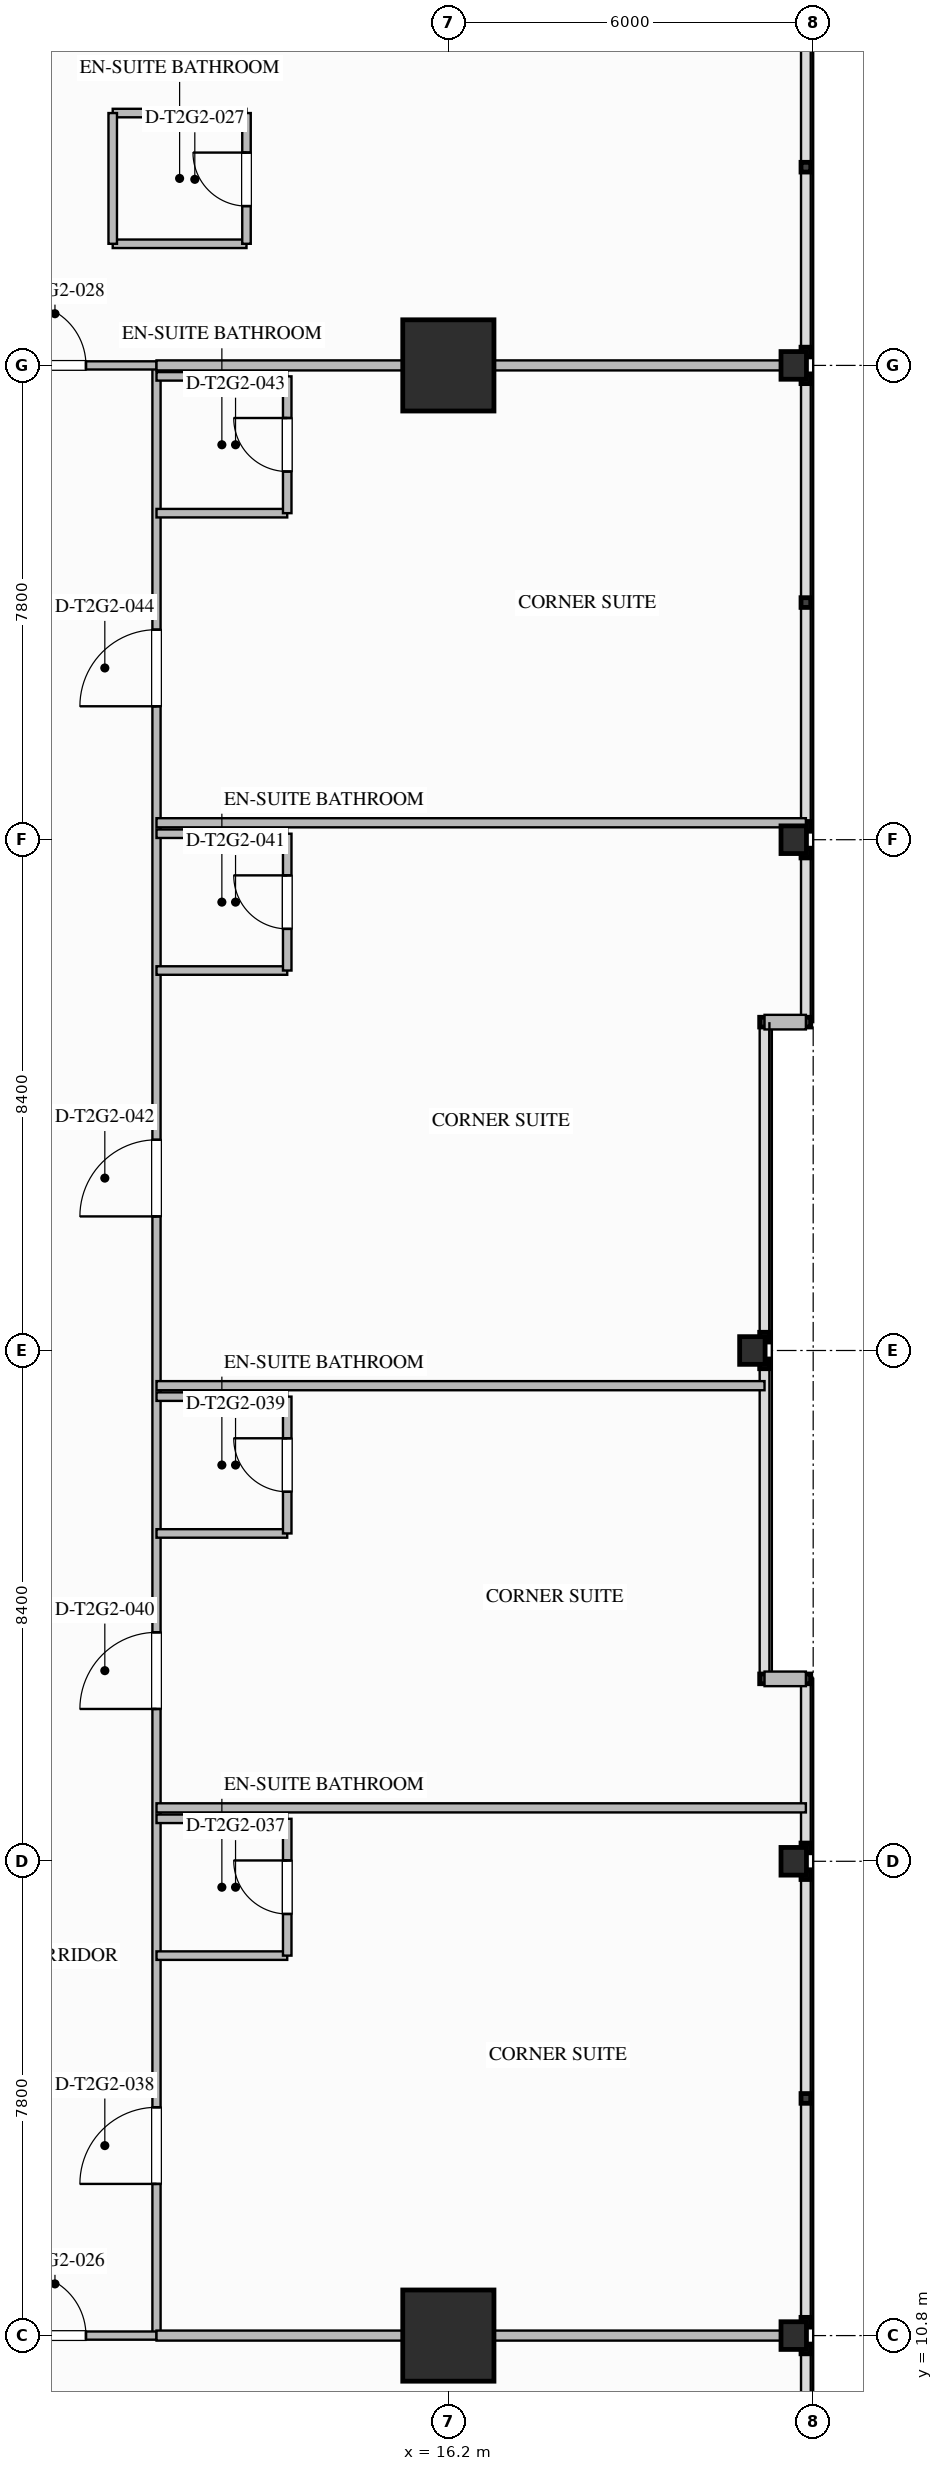
"""IFC4 building model, lengths in metres.
Left out: names, types, materials, properties, quantities, classifications, styles, units other than length and angle.
Written with IfcOpenShell. Run it as: python <this file> out.ifc"""

import sys

from ifc_helpers import new_model, si_unit, direction, frame, frame_2d, origin, origin_2d, place, context, subcontext, project, spatial, rectangle, i_section, extrude, element, fill, save


model = new_model("IFC4")
c1 = context("Model", 3, precision=1e-05, world=origin(), true_north=direction((0.0, 1.0)))
c2 = subcontext(c1, "Body", "Model", "MODEL_VIEW")
j1 = project(units=[si_unit("LENGTHUNIT", "METRE"), si_unit("PLANEANGLEUNIT", "RADIAN")], contexts=[c1])
p1 = place(None, origin())
s1 = spatial("IfcSite", under=j1, at=p1, CompositionType="ELEMENT")
p2 = place(p1, origin())
s2 = spatial("IfcBuilding", under=s1, at=p2, CompositionType="ELEMENT")
p3 = place(p2, frame((0.0, 0.0, 102.3)))
s3 = spatial("IfcBuildingStorey", under=s2, at=p3, CompositionType="ELEMENT", Elevation=102.3)
for number, where, z_axis, x_axis in (
    (1, (16.2, 10.8, 0.0), (0.0, 0.0, 1.0), (1.0, 0.0, 0.0)),
    (2, (16.2, 43.2, 0.0), (0.0, 0.0, 1.0), (1.0, 0.0, 0.0)),
):
    element("IfcColumn", number, at=place(p3, frame(where, z_axis=z_axis, x_axis=x_axis)), inside=s3, PredefinedType="COLUMN", context=c2, shape_type="SweptSolid", body=[
        extrude(rectangle(XDim=1.5, YDim=1.5, at=origin_2d()), origin(), (0.0, 0.0, 1.0), 3.5),
    ])
for number, where, z_axis, x_axis in (
    (3, (21.88, 10.8, 0.0), (0.0, 0.0, 1.0), (1.0, 0.0, 0.0)),
    (4, (21.88, 18.6, 0.0), (0.0, 0.0, 1.0), (1.0, 0.0, 0.0)),
    (5, (21.2, 27.0, 0.0), (0.0, 0.0, 1.0), (1.0, 0.0, 0.0)),
    (6, (21.88, 35.4, 0.0), (0.0, 0.0, 1.0), (1.0, 0.0, 0.0)),
    (7, (21.88, 43.2, 0.0), (0.0, 0.0, 1.0), (1.0, 0.0, 0.0)),
):
    element("IfcColumn", number, at=place(p3, frame(where, z_axis=z_axis, x_axis=x_axis)), inside=s3, PredefinedType="COLUMN", context=c2, shape_type="SweptSolid", body=[
        extrude(i_section(OverallWidth=0.418, OverallDepth=0.455, WebThickness=0.042, FlangeThickness=0.068, FilletRadius=0.03, at=origin_2d()), origin(), (0.0, 0.0, 1.0), 3.497),
    ])
for number, where, z_axis, x_axis in (
    (8, (22.08, 32.4, 0.0), (0.0, 0.0, 1.0), (-1.0, 0.0, 0.0)),
    (9, (21.4, 21.6, 0.0), (0.0, 0.0, 1.0), (1.0, 0.0, 0.0)),
):
    element("IfcWall", number, at=place(p3, frame(where, z_axis=z_axis, x_axis=x_axis)), inside=s3, PredefinedType="STANDARD", context=c2, shape_type="SweptSolid", body=[
        extrude(rectangle(XDim=0.68, YDim=0.24, at=frame_2d((0.34, 0.0))), origin(), (0.0, 0.0, 1.0), 3.24),
    ])
p4 = place(p3, frame((11.4, 10.8, 0.0), z_axis=(0.0, 0.0, 1.0), x_axis=(0.0, 1.0, 0.0)))
e10 = element("IfcWall", 10, at=p4, inside=s3, PredefinedType="PARTITIONING", context=c2, shape_type="SweptSolid", body=[
    extrude(rectangle(XDim=32.4, YDim=0.135, at=frame_2d((16.2, 0.0))), origin(), (0.0, 0.0, 1.0), 3.24),
])
p5 = place(p4, frame((2.494, 0.0, 0.0)))
e11 = element("IfcOpeningElement", 11, at=p5, cuts=e10, PredefinedType="OPENING", context=c2, shape_type="SweptSolid", body=[
    extrude(rectangle(XDim=1.26, YDim=2.2, at=frame_2d((0.63, 1.1))), frame((0.0, 0.077, 0.0), z_axis=(0.0, -1.0, 0.0), x_axis=(1.0, 0.0, 0.0)), (0.0, 0.0, 1.0), 0.155),
])
p6 = place(p4, frame((10.305, 0.0, 0.0)))
e12 = element("IfcOpeningElement", 12, at=p6, cuts=e10, PredefinedType="OPENING", context=c2, shape_type="SweptSolid", body=[
    extrude(rectangle(XDim=1.26, YDim=2.2, at=frame_2d((0.63, 1.1))), frame((0.0, 0.077, 0.0), z_axis=(0.0, -1.0, 0.0), x_axis=(1.0, 0.0, 0.0)), (0.0, 0.0, 1.0), 0.155),
])
p7 = place(p4, frame((18.405, 0.0, 0.0)))
e13 = element("IfcOpeningElement", 13, at=p7, cuts=e10, PredefinedType="OPENING", context=c2, shape_type="SweptSolid", body=[
    extrude(rectangle(XDim=1.26, YDim=2.2, at=frame_2d((0.63, 1.1))), frame((0.0, 0.077, 0.0), z_axis=(0.0, -1.0, 0.0), x_axis=(1.0, 0.0, 0.0)), (0.0, 0.0, 1.0), 0.155),
])
p8 = place(p4, frame((26.794, 0.0, 0.0)))
e14 = element("IfcOpeningElement", 14, at=p8, cuts=e10, PredefinedType="OPENING", context=c2, shape_type="SweptSolid", body=[
    extrude(rectangle(XDim=1.26, YDim=2.2, at=frame_2d((0.63, 1.1))), frame((0.0, 0.077, 0.0), z_axis=(0.0, -1.0, 0.0), x_axis=(1.0, 0.0, 0.0)), (0.0, 0.0, 1.0), 0.155),
])
p9 = place(p3, frame((8.7, 10.8, 0.0), z_axis=(0.0, 0.0, 1.0), x_axis=(1.0, 0.0, 0.0)))
e15 = element("IfcWall", 15, at=p9, inside=s3, PredefinedType="PARTITIONING", context=c2, shape_type="SweptSolid", body=[
    extrude(rectangle(XDim=2.7, YDim=0.135, at=frame_2d((1.35, 0.0))), origin(), (0.0, 0.0, 1.0), 2.452),
])
p10 = place(p9, frame((0.52, 0.0, 0.0)))
e16 = element("IfcOpeningElement", 16, at=p10, cuts=e15, PredefinedType="OPENING", context=c2, shape_type="SweptSolid", body=[
    extrude(rectangle(XDim=1.02, YDim=2.15, at=frame_2d((0.51, 1.075))), frame((0.0, 0.077, 0.0), z_axis=(0.0, -1.0, 0.0), x_axis=(1.0, 0.0, 0.0)), (0.0, 0.0, 1.0), 0.155),
])
p11 = place(p3, frame((8.7, 43.2, 0.0), z_axis=(0.0, 0.0, 1.0), x_axis=(1.0, 0.0, 0.0)))
e17 = element("IfcWall", 17, at=p11, inside=s3, PredefinedType="PARTITIONING", context=c2, shape_type="SweptSolid", body=[
    extrude(rectangle(XDim=2.7, YDim=0.135, at=frame_2d((1.35, 0.0))), origin(), (0.0, 0.0, 1.0), 2.452),
])
p12 = place(p11, frame((0.52, 0.0, 0.0)))
e18 = element("IfcOpeningElement", 18, at=p12, cuts=e17, PredefinedType="OPENING", context=c2, shape_type="SweptSolid", body=[
    extrude(rectangle(XDim=1.02, YDim=2.15, at=frame_2d((0.51, 1.075))), frame((0.0, 0.077, 0.0), z_axis=(0.0, -1.0, 0.0), x_axis=(1.0, 0.0, 0.0)), (0.0, 0.0, 1.0), 0.155),
])
for number, where, z_axis, x_axis in (
    (19, (11.4, 10.8, 0.0), (0.0, 0.0, 1.0), (1.0, 0.0, 0.0)),
    (20, (11.4, 43.2, 0.0), (0.0, 0.0, 1.0), (1.0, 0.0, 0.0)),
):
    element("IfcWall", number, at=place(p3, frame(where, z_axis=z_axis, x_axis=x_axis)), inside=s3, PredefinedType="PARTITIONING", context=c2, shape_type="SweptSolid", body=[
        extrude(rectangle(XDim=10.68, YDim=0.165, at=frame_2d((5.34, 0.0))), origin(), (0.0, 0.0, 1.0), 2.452),
    ])
for number, where, z_axis, x_axis in (
    (21, (10.68, 45.2, 0.0), (0.0, 0.0, 1.0), (1.0, 0.0, 0.0)),
    (22, (10.68, 47.35, 0.0), (0.0, 0.0, 1.0), (1.0, 0.0, 0.0)),
):
    element("IfcWall", number, at=place(p3, frame(where, z_axis=z_axis, x_axis=x_axis)), inside=s3, PredefinedType="PLUMBINGWALL", context=c2, shape_type="SweptSolid", body=[
        extrude(rectangle(XDim=2.2, YDim=0.14, at=frame_2d((1.1, 0.0))), origin(), (0.0, 0.0, 1.0), 3.24),
    ])
p13 = place(p3, frame((10.68, 45.2, 0.0), z_axis=(0.0, 0.0, 1.0), x_axis=(0.0, 1.0, 0.0)))
e23 = element("IfcWall", 23, at=p13, inside=s3, PredefinedType="PLUMBINGWALL", context=c2, shape_type="SweptSolid", body=[
    extrude(rectangle(XDim=2.15, YDim=0.14, at=frame_2d((1.075, 0.0))), origin(), (0.0, 0.0, 1.0), 3.24),
])
p14 = place(p3, frame((12.88, 45.2, 0.0), z_axis=(0.0, 0.0, 1.0), x_axis=(0.0, 1.0, 0.0)))
e24 = element("IfcWall", 24, at=p14, inside=s3, PredefinedType="PLUMBINGWALL", context=c2, shape_type="SweptSolid", body=[
    extrude(rectangle(XDim=2.15, YDim=0.14, at=frame_2d((1.075, 0.0))), origin(), (0.0, 0.0, 1.0), 3.24),
])
p15 = place(p14, frame((0.62, 0.0, 0.0)))
e25 = element("IfcOpeningElement", 25, at=p15, cuts=e24, PredefinedType="OPENING", context=c2, shape_type="SweptSolid", body=[
    extrude(rectangle(XDim=0.88, YDim=2.1, at=frame_2d((0.44, 1.05))), frame((0.0, 0.08, 0.0), z_axis=(0.0, -1.0, 0.0), x_axis=(1.0, 0.0, 0.0)), (0.0, 0.0, 1.0), 0.16),
])
for number, where, z_axis, x_axis in (
    (26, (11.4, 17.049, 0.0), (0.0, 0.0, 1.0), (1.0, 0.0, 0.0)),
    (27, (11.4, 19.299, 0.0), (0.0, 0.0, 1.0), (1.0, 0.0, 0.0)),
):
    element("IfcWall", number, at=place(p3, frame(where, z_axis=z_axis, x_axis=x_axis)), inside=s3, PredefinedType="PLUMBINGWALL", context=c2, shape_type="SweptSolid", body=[
        extrude(rectangle(XDim=2.15, YDim=0.14, at=frame_2d((1.075, 0.0))), origin(), (0.0, 0.0, 1.0), 3.24),
    ])
p16 = place(p3, frame((13.55, 17.049, 0.0), z_axis=(0.0, 0.0, 1.0), x_axis=(0.0, 1.0, 0.0)))
e28 = element("IfcWall", 28, at=p16, inside=s3, PredefinedType="PLUMBINGWALL", context=c2, shape_type="SweptSolid", body=[
    extrude(rectangle(XDim=2.25, YDim=0.14, at=frame_2d((1.125, 0.0))), origin(), (0.0, 0.0, 1.0), 3.24),
])
p17 = place(p16, frame((0.685, 0.0, 0.0)))
e29 = element("IfcOpeningElement", 29, at=p17, cuts=e28, PredefinedType="OPENING", context=c2, shape_type="SweptSolid", body=[
    extrude(rectangle(XDim=0.88, YDim=2.1, at=frame_2d((0.44, 1.05))), frame((0.0, 0.08, 0.0), z_axis=(0.0, -1.0, 0.0), x_axis=(1.0, 0.0, 0.0)), (0.0, 0.0, 1.0), 0.16),
])
p18 = place(p3, frame((11.4, 19.479, 0.0), z_axis=(0.0, 0.0, 1.0), x_axis=(1.0, 0.0, 0.0)))
e30 = element("IfcWall", 30, at=p18, inside=s3, PredefinedType="PARTITIONING", context=c2, shape_type="SweptSolid", body=[
    extrude(rectangle(XDim=10.68, YDim=0.15, at=frame_2d((5.34, 0.0))), origin(), (0.0, 0.0, 1.0), 3.24),
])
for number, where, z_axis, x_axis in (
    (31, (11.4, 23.991, 0.0), (0.0, 0.0, 1.0), (1.0, 0.0, 0.0)),
    (32, (11.4, 26.241, 0.0), (0.0, 0.0, 1.0), (1.0, 0.0, 0.0)),
):
    element("IfcWall", number, at=place(p3, frame(where, z_axis=z_axis, x_axis=x_axis)), inside=s3, PredefinedType="PLUMBINGWALL", context=c2, shape_type="SweptSolid", body=[
        extrude(rectangle(XDim=2.15, YDim=0.14, at=frame_2d((1.075, 0.0))), origin(), (0.0, 0.0, 1.0), 3.24),
    ])
p19 = place(p3, frame((13.55, 23.991, 0.0), z_axis=(0.0, 0.0, 1.0), x_axis=(0.0, 1.0, 0.0)))
e33 = element("IfcWall", 33, at=p19, inside=s3, PredefinedType="PLUMBINGWALL", context=c2, shape_type="SweptSolid", body=[
    extrude(rectangle(XDim=2.25, YDim=0.14, at=frame_2d((1.125, 0.0))), origin(), (0.0, 0.0, 1.0), 3.24),
])
p20 = place(p19, frame((0.685, 0.0, 0.0)))
e34 = element("IfcOpeningElement", 34, at=p20, cuts=e33, PredefinedType="OPENING", context=c2, shape_type="SweptSolid", body=[
    extrude(rectangle(XDim=0.88, YDim=2.1, at=frame_2d((0.44, 1.05))), frame((0.0, 0.08, 0.0), z_axis=(0.0, -1.0, 0.0), x_axis=(1.0, 0.0, 0.0)), (0.0, 0.0, 1.0), 0.16),
])
p21 = place(p3, frame((11.4, 26.421, 0.0), z_axis=(0.0, 0.0, 1.0), x_axis=(1.0, 0.0, 0.0)))
e35 = element("IfcWall", 35, at=p21, inside=s3, PredefinedType="PARTITIONING", context=c2, shape_type="SweptSolid", body=[
    extrude(rectangle(XDim=10.0, YDim=0.15, at=frame_2d((5.0, 0.0))), origin(), (0.0, 0.0, 1.0), 3.24),
])
p22 = place(p3, frame((11.4, 33.249, 0.0), z_axis=(0.0, 0.0, 1.0), x_axis=(1.0, 0.0, 0.0)))
e36 = element("IfcWall", 36, at=p22, inside=s3, PredefinedType="PLUMBINGWALL", context=c2, shape_type="SweptSolid", body=[
    extrude(rectangle(XDim=2.15, YDim=0.14, at=frame_2d((1.075, 0.0))), origin(), (0.0, 0.0, 1.0), 3.24),
])
p23 = place(p3, frame((11.4, 35.499, 0.0), z_axis=(0.0, 0.0, 1.0), x_axis=(1.0, 0.0, 0.0)))
e37 = element("IfcWall", 37, at=p23, inside=s3, PredefinedType="PLUMBINGWALL", context=c2, shape_type="SweptSolid", body=[
    extrude(rectangle(XDim=2.15, YDim=0.14, at=frame_2d((1.075, 0.0))), origin(), (0.0, 0.0, 1.0), 2.617),
])
p24 = place(p3, frame((13.55, 33.249, 0.0), z_axis=(0.0, 0.0, 1.0), x_axis=(0.0, 1.0, 0.0)))
e38 = element("IfcWall", 38, at=p24, inside=s3, PredefinedType="PLUMBINGWALL", context=c2, shape_type="SweptSolid", body=[
    extrude(rectangle(XDim=2.25, YDim=0.14, at=frame_2d((1.125, 0.0))), origin(), (0.0, 0.0, 1.0), 3.24),
])
p25 = place(p24, frame((0.685, 0.0, 0.0)))
e39 = element("IfcOpeningElement", 39, at=p25, cuts=e38, PredefinedType="OPENING", context=c2, shape_type="SweptSolid", body=[
    extrude(rectangle(XDim=0.88, YDim=2.1, at=frame_2d((0.44, 1.05))), frame((0.0, 0.08, 0.0), z_axis=(0.0, -1.0, 0.0), x_axis=(1.0, 0.0, 0.0)), (0.0, 0.0, 1.0), 0.16),
])
p26 = place(p3, frame((11.4, 35.679, 0.0), z_axis=(0.0, 0.0, 1.0), x_axis=(1.0, 0.0, 0.0)))
e40 = element("IfcWall", 40, at=p26, inside=s3, PredefinedType="PARTITIONING", context=c2, shape_type="SweptSolid", body=[
    extrude(rectangle(XDim=10.68, YDim=0.15, at=frame_2d((5.34, 0.0))), origin(), (0.0, 0.0, 1.0), 2.452),
])
p27 = place(p3, frame((11.4, 40.77, 0.0), z_axis=(0.0, 0.0, 1.0), x_axis=(1.0, 0.0, 0.0)))
e41 = element("IfcWall", 41, at=p27, inside=s3, PredefinedType="PLUMBINGWALL", context=c2, shape_type="SweptSolid", body=[
    extrude(rectangle(XDim=2.15, YDim=0.14, at=frame_2d((1.075, 0.0))), origin(), (0.0, 0.0, 1.0), 3.24),
])
p28 = place(p3, frame((11.4, 43.02, 0.0), z_axis=(0.0, 0.0, 1.0), x_axis=(1.0, 0.0, 0.0)))
e42 = element("IfcWall", 42, at=p28, inside=s3, PredefinedType="PLUMBINGWALL", context=c2, shape_type="SweptSolid", body=[
    extrude(rectangle(XDim=2.15, YDim=0.14, at=frame_2d((1.075, 0.0))), origin(), (0.0, 0.0, 1.0), 2.452),
])
p29 = place(p3, frame((13.55, 40.77, 0.0), z_axis=(0.0, 0.0, 1.0), x_axis=(0.0, 1.0, 0.0)))
e43 = element("IfcWall", 43, at=p29, inside=s3, PredefinedType="PLUMBINGWALL", context=c2, shape_type="SweptSolid", body=[
    extrude(rectangle(XDim=2.25, YDim=0.14, at=frame_2d((1.125, 0.0))), origin(), (0.0, 0.0, 1.0), 3.24),
])
p30 = place(p29, frame((0.685, 0.0, 0.0)))
e44 = element("IfcOpeningElement", 44, at=p30, cuts=e43, PredefinedType="OPENING", context=c2, shape_type="SweptSolid", body=[
    extrude(rectangle(XDim=0.88, YDim=2.1, at=frame_2d((0.44, 1.05))), frame((0.0, 0.08, 0.0), z_axis=(0.0, -1.0, 0.0), x_axis=(1.0, 0.0, 0.0)), (0.0, 0.0, 1.0), 0.16),
])
p31 = place(p10, origin())
e45 = element("IfcDoor", 45, at=p31, inside=s3, OperationType="SINGLE_SWING_LEFT", PredefinedType="DOOR", context=c2, shape_type="SweptSolid", body=[
    extrude(rectangle(XDim=1.02, YDim=2.15, at=frame_2d((0.51, 1.075))), frame((0.0, 0.025, 0.0), z_axis=(0.0, -1.0, 0.0), x_axis=(1.0, 0.0, 0.0)), (0.0, 0.0, 1.0), 0.05),
])
fill(e16, e45)
p32 = place(p15, origin())
e46 = element("IfcDoor", 46, at=p32, inside=s3, OperationType="SINGLE_SWING_RIGHT", PredefinedType="DOOR", context=c2, shape_type="SweptSolid", body=[
    extrude(rectangle(XDim=0.88, YDim=2.1, at=frame_2d((0.44, 1.05))), frame((0.0, 0.025, 0.0), z_axis=(0.0, -1.0, 0.0), x_axis=(1.0, 0.0, 0.0)), (0.0, 0.0, 1.0), 0.05),
])
fill(e25, e46)
p33 = place(p12, origin())
e47 = element("IfcDoor", 47, at=p33, inside=s3, OperationType="SINGLE_SWING_LEFT", PredefinedType="DOOR", context=c2, shape_type="SweptSolid", body=[
    extrude(rectangle(XDim=1.02, YDim=2.15, at=frame_2d((0.51, 1.075))), frame((0.0, 0.025, 0.0), z_axis=(0.0, -1.0, 0.0), x_axis=(1.0, 0.0, 0.0)), (0.0, 0.0, 1.0), 0.05),
])
fill(e18, e47)
p34 = place(p17, origin())
e48 = element("IfcDoor", 48, at=p34, inside=s3, OperationType="SINGLE_SWING_RIGHT", PredefinedType="DOOR", context=c2, shape_type="SweptSolid", body=[
    extrude(rectangle(XDim=0.88, YDim=2.1, at=frame_2d((0.44, 1.05))), frame((0.0, 0.025, 0.0), z_axis=(0.0, -1.0, 0.0), x_axis=(1.0, 0.0, 0.0)), (0.0, 0.0, 1.0), 0.05),
])
fill(e29, e48)
p35 = place(p5, origin())
e49 = element("IfcDoor", 49, at=p35, inside=s3, OperationType="SINGLE_SWING_LEFT", PredefinedType="DOOR", context=c2, shape_type="SweptSolid", body=[
    extrude(rectangle(XDim=1.26, YDim=2.2, at=frame_2d((0.63, 1.1))), frame((0.0, 0.025, 0.0), z_axis=(0.0, -1.0, 0.0), x_axis=(1.0, 0.0, 0.0)), (0.0, 0.0, 1.0), 0.05),
])
fill(e11, e49)
p36 = place(p20, origin())
e50 = element("IfcDoor", 50, at=p36, inside=s3, OperationType="SINGLE_SWING_RIGHT", PredefinedType="DOOR", context=c2, shape_type="SweptSolid", body=[
    extrude(rectangle(XDim=0.88, YDim=2.1, at=frame_2d((0.44, 1.05))), frame((0.0, 0.025, 0.0), z_axis=(0.0, -1.0, 0.0), x_axis=(1.0, 0.0, 0.0)), (0.0, 0.0, 1.0), 0.05),
])
fill(e34, e50)
p37 = place(p6, origin())
e51 = element("IfcDoor", 51, at=p37, inside=s3, OperationType="SINGLE_SWING_LEFT", PredefinedType="DOOR", context=c2, shape_type="SweptSolid", body=[
    extrude(rectangle(XDim=1.26, YDim=2.2, at=frame_2d((0.63, 1.1))), frame((0.0, 0.025, 0.0), z_axis=(0.0, -1.0, 0.0), x_axis=(1.0, 0.0, 0.0)), (0.0, 0.0, 1.0), 0.05),
])
fill(e12, e51)
p38 = place(p25, origin())
e52 = element("IfcDoor", 52, at=p38, inside=s3, OperationType="SINGLE_SWING_RIGHT", PredefinedType="DOOR", context=c2, shape_type="SweptSolid", body=[
    extrude(rectangle(XDim=0.88, YDim=2.1, at=frame_2d((0.44, 1.05))), frame((0.0, 0.025, 0.0), z_axis=(0.0, -1.0, 0.0), x_axis=(1.0, 0.0, 0.0)), (0.0, 0.0, 1.0), 0.05),
])
fill(e39, e52)
p39 = place(p7, origin())
e53 = element("IfcDoor", 53, at=p39, inside=s3, OperationType="SINGLE_SWING_LEFT", PredefinedType="DOOR", context=c2, shape_type="SweptSolid", body=[
    extrude(rectangle(XDim=1.26, YDim=2.2, at=frame_2d((0.63, 1.1))), frame((0.0, 0.025, 0.0), z_axis=(0.0, -1.0, 0.0), x_axis=(1.0, 0.0, 0.0)), (0.0, 0.0, 1.0), 0.05),
])
fill(e13, e53)
p40 = place(p30, origin())
e54 = element("IfcDoor", 54, at=p40, inside=s3, OperationType="SINGLE_SWING_RIGHT", PredefinedType="DOOR", context=c2, shape_type="SweptSolid", body=[
    extrude(rectangle(XDim=0.88, YDim=2.1, at=frame_2d((0.44, 1.05))), frame((0.0, 0.025, 0.0), z_axis=(0.0, -1.0, 0.0), x_axis=(1.0, 0.0, 0.0)), (0.0, 0.0, 1.0), 0.05),
])
fill(e44, e54)
p41 = place(p8, origin())
e55 = element("IfcDoor", 55, at=p41, inside=s3, OperationType="SINGLE_SWING_LEFT", PredefinedType="DOOR", context=c2, shape_type="SweptSolid", body=[
    extrude(rectangle(XDim=1.26, YDim=2.2, at=frame_2d((0.63, 1.1))), frame((0.0, 0.025, 0.0), z_axis=(0.0, -1.0, 0.0), x_axis=(1.0, 0.0, 0.0)), (0.0, 0.0, 1.0), 0.05),
])
fill(e14, e55)
save(model, sys.argv[1])
